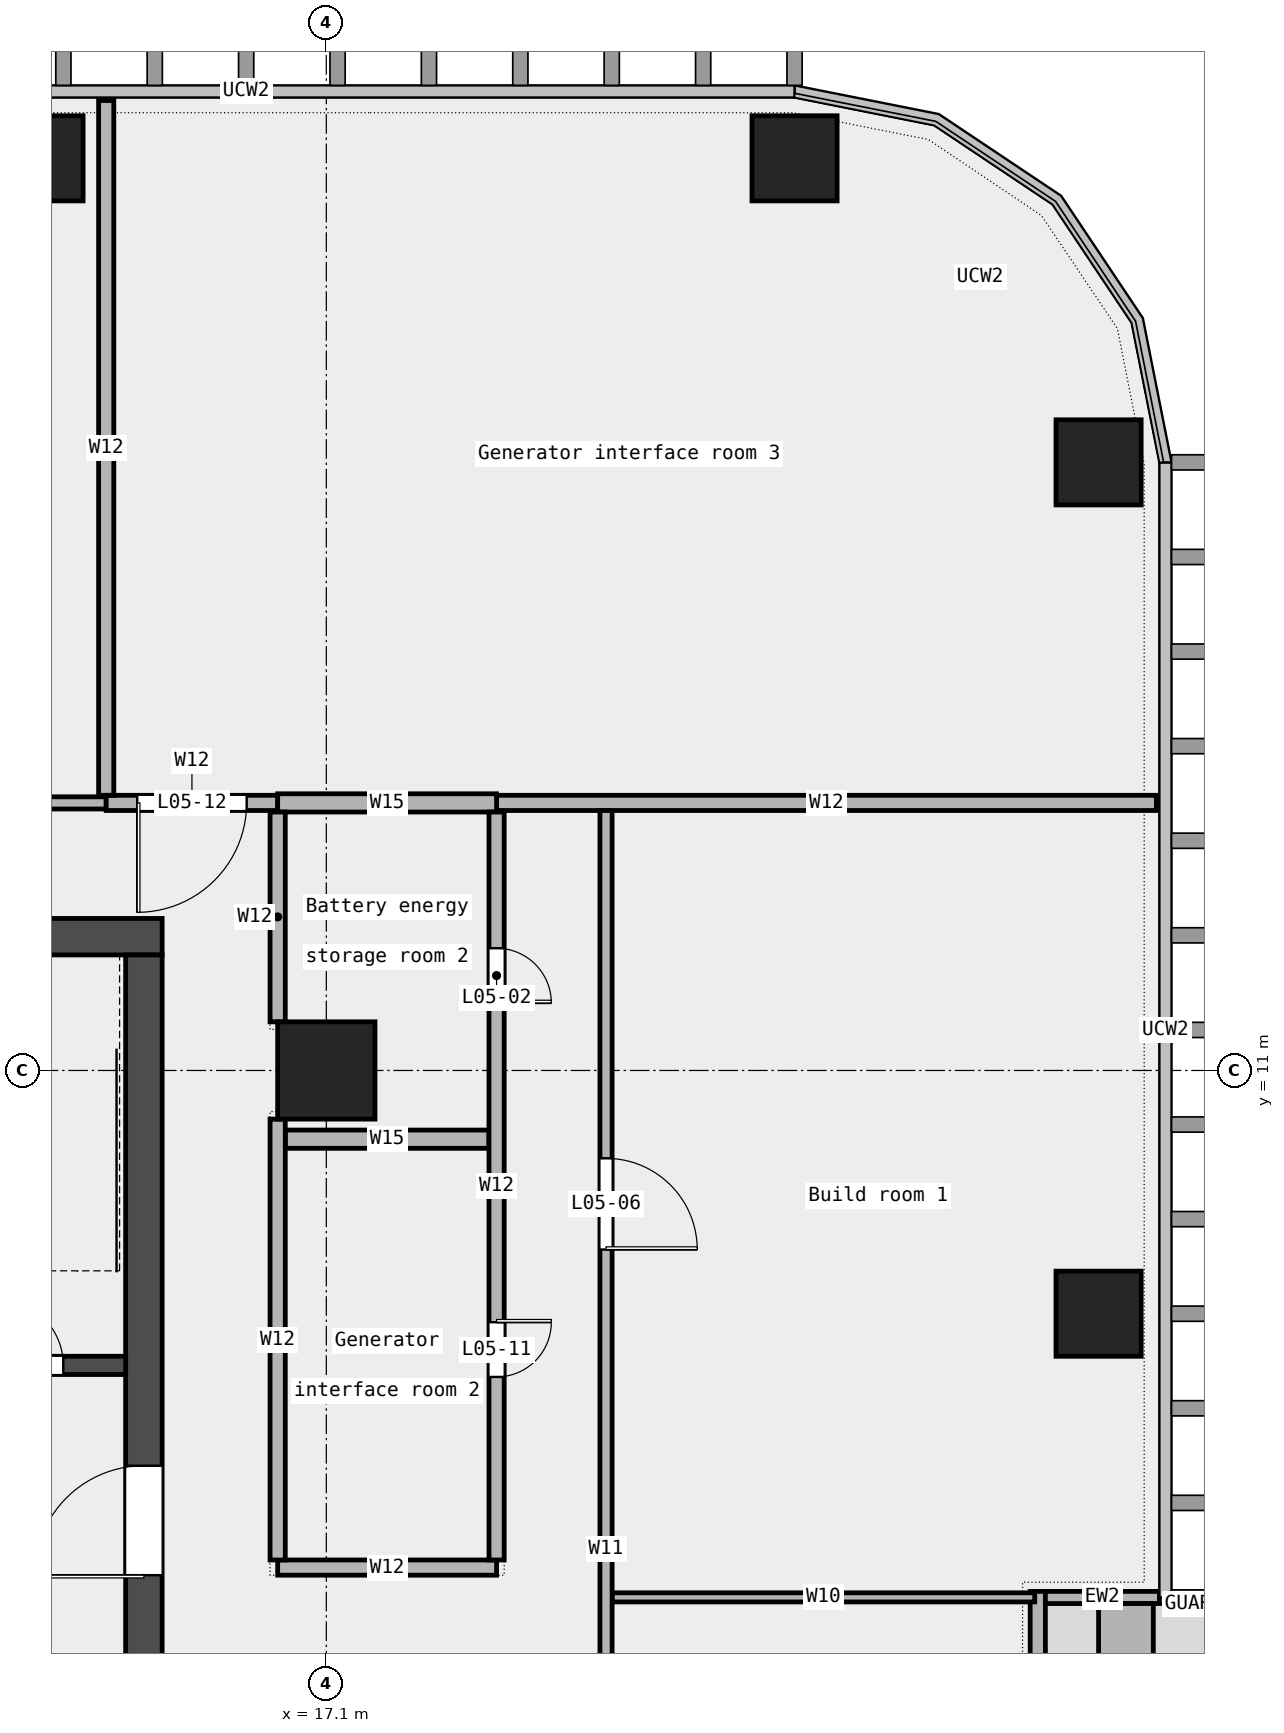
"""IFC4 building model, lengths in metres.
Left out: names, types, materials, properties, quantities, classifications, styles, units other than length and angle.
Written with IfcOpenShell. Run it as: python <this file> out.ifc"""

import sys

from ifc_helpers import new_model, si_unit, direction, frame, frame_2d, origin, origin_2d, place, context, subcontext, project, spatial, rectangle, extrude, element, fill, save


model = new_model("IFC4")
c1 = context("Model", 3, precision=1e-05, world=origin(), true_north=direction((0.0, 1.0)))
c2 = subcontext(c1, "Body", "Model", "MODEL_VIEW")
j1 = project(units=[si_unit("LENGTHUNIT", "METRE"), si_unit("PLANEANGLEUNIT", "RADIAN")], contexts=[c1])
p1 = place(None, origin())
s1 = spatial("IfcSite", under=j1, at=p1, CompositionType="ELEMENT")
p2 = place(p1, origin())
s2 = spatial("IfcBuilding", under=s1, at=p2, CompositionType="ELEMENT")
p3 = place(p2, frame((0.0, 0.0, 31.0)))
s3 = spatial("IfcBuildingStorey", under=s2, at=p3, CompositionType="ELEMENT", Elevation=31.0)
for number, where, z_axis, x_axis in (
    (1, (29.8, 7.0, 0.0), (0.0, 0.0, 1.0), (1.0, 0.0, 0.0)),
    (2, (29.8, 21.0, 0.0), (0.0, 0.0, 1.0), (1.0, 0.0, 0.0)),
    (3, (24.8, 26.0, 0.0), (0.0, 0.0, 1.0), (1.0, 0.0, 0.0)),
    (4, (12.4, 26.0, 0.0), (0.0, 0.0, 1.0), (1.0, 0.0, 0.0)),
):
    element("IfcColumn", number, at=place(p3, frame(where, z_axis=z_axis, x_axis=x_axis)), inside=s3, PredefinedType="COLUMN", context=c2, shape_type="SweptSolid", body=[
        extrude(rectangle(XDim=1.4, YDim=1.4, at=origin_2d()), origin(), (0.0, 0.0, 1.0), 4.35),
    ])
p4 = place(p3, frame((17.1, 11.0, 0.0), z_axis=(0.0, 0.0, 1.0), x_axis=(1.0, 0.0, 0.0)))
e5 = element("IfcColumn", 5, at=p4, inside=s3, PredefinedType="COLUMN", context=c2, shape_type="SweptSolid", body=[
    extrude(rectangle(XDim=1.6, YDim=1.6, at=origin_2d()), origin(), (0.0, 0.0, 1.0), 4.35),
])
p5 = place(p3, frame((28.8, -11.767, 0.0), z_axis=(0.0, 0.0, 1.0), x_axis=(0.0, 1.0, 0.0)))
e6 = element("IfcWall", 6, at=p5, inside=s3, PredefinedType="STANDARD", context=c2, shape_type="SweptSolid", body=[
    extrude(rectangle(XDim=14.2, YDim=0.25, at=frame_2d((7.1, 0.0))), origin(), (0.0, 0.0, 1.0), 4.35),
])
p6 = place(p5, frame((1.75, 0.0, 0.45)))
e7 = element("IfcOpeningElement", 7, at=p6, cuts=e6, PredefinedType="OPENING", context=c2, shape_type="SweptSolid", body=[
    extrude(rectangle(XDim=1.5, YDim=3.0, at=frame_2d((0.75, 1.5))), frame((0.0, 0.137, 0.0), z_axis=(0.0, -1.0, 0.0), x_axis=(1.0, 0.0, 0.0)), (0.0, 0.0, 1.0), 0.274),
])
p7 = place(p5, frame((6.25, 0.0, 0.0)))
e8 = element("IfcOpeningElement", 8, at=p7, cuts=e6, PredefinedType="OPENING", context=c2, shape_type="SweptSolid", body=[
    extrude(rectangle(XDim=1.8, YDim=2.4, at=frame_2d((0.9, 1.2))), frame((0.0, 0.137, 0.0), z_axis=(0.0, -1.0, 0.0), x_axis=(1.0, 0.0, 0.0)), (0.0, 0.0, 1.0), 0.274),
])
p8 = place(p5, frame((11.0, 0.0, 0.45)))
e9 = element("IfcOpeningElement", 9, at=p8, cuts=e6, PredefinedType="OPENING", context=c2, shape_type="SweptSolid", body=[
    extrude(rectangle(XDim=1.5, YDim=3.0, at=frame_2d((0.75, 1.5))), frame((0.0, 0.137, 0.0), z_axis=(0.0, -1.0, 0.0), x_axis=(1.0, 0.0, 0.0)), (0.0, 0.0, 1.0), 0.274),
])
p9 = place(p3, frame((30.8, 2.333, 0.0), z_axis=(0.0, 0.0, 1.0), x_axis=(-1.0, 0.0, 0.0)))
e10 = element("IfcWall", 10, at=p9, inside=s3, PredefinedType="STANDARD", context=c2, shape_type="SweptSolid", body=[
    extrude(rectangle(XDim=1.875, YDim=0.2, at=frame_2d((0.938, 0.0))), origin(), (0.0, 0.0, 1.0), 4.35),
])
p10 = place(p3, frame((30.25, -1.367, 0.0), z_axis=(0.0, 0.0, 1.0), x_axis=(0.0, 1.0, 0.0)))
e11 = element("IfcWall", 11, at=p10, inside=s3, PredefinedType="STANDARD", context=c2, shape_type="SweptSolid", body=[
    extrude(rectangle(XDim=3.6, YDim=0.9, at=frame_2d((1.8, 0.0))), origin(), (0.0, 0.0, 1.0), 0.7),
])
p11 = place(p3, frame((21.8, 2.335, 0.0), z_axis=(0.0, 0.0, 1.0), x_axis=(1.0, 0.0, 0.0)))
e12 = element("IfcWall", 12, at=p11, inside=s3, PredefinedType="PARTITIONING", context=c2, shape_type="SweptSolid", body=[
    extrude(rectangle(XDim=6.95, YDim=0.15, at=frame_2d((3.475, 0.0))), origin(), (0.0, 0.0, 1.0), 4.35),
])
p12 = place(p3, frame((16.3, 2.825, 0.0), z_axis=(0.0, 0.0, 1.0), x_axis=(1.0, 0.0, 0.0)))
e13 = element("IfcWall", 13, at=p12, inside=s3, PredefinedType="PARTITIONING", context=c2, shape_type="SweptSolid", body=[
    extrude(rectangle(XDim=3.6, YDim=0.25, at=frame_2d((1.8, 0.0))), origin(), (0.0, 0.0, 1.0), 4.35),
])
p13 = place(p3, frame((16.425, 9.87, 0.0), z_axis=(0.0, 0.0, 1.0), x_axis=(1.0, 0.0, 0.0)))
e14 = element("IfcWall", 14, at=p13, inside=s3, PredefinedType="PARTITIONING", context=c2, shape_type="SweptSolid", body=[
    extrude(rectangle(XDim=3.35, YDim=0.3, at=frame_2d((1.675, 0.0))), origin(), (0.0, 0.0, 1.0), 4.35),
])
p14 = place(p3, frame((-6.765, 15.4, 0.0), z_axis=(0.0, 0.0, 1.0), x_axis=(1.0, 0.0, 0.0)))
e15 = element("IfcWall", 15, at=p14, inside=s3, PredefinedType="PARTITIONING", context=c2, shape_type="SweptSolid", body=[
    extrude(rectangle(XDim=20.245, YDim=0.2, at=frame_2d((10.123, 0.0))), origin(), (0.0, 0.0, 1.0), 4.35),
])
p15 = place(p14, frame((6.015, 0.0, 0.0)))
e16 = element("IfcOpeningElement", 16, at=p15, cuts=e15, PredefinedType="OPENING", context=c2, shape_type="SweptSolid", body=[
    extrude(rectangle(XDim=1.5, YDim=2.1, at=frame_2d((0.75, 1.05))), frame((0.0, 0.112, 0.0), z_axis=(0.0, -1.0, 0.0), x_axis=(1.0, 0.0, 0.0)), (0.0, 0.0, 1.0), 0.224),
])
p16 = place(p14, frame((16.288, 0.0, 0.0)))
e17 = element("IfcOpeningElement", 17, at=p16, cuts=e15, PredefinedType="OPENING", context=c2, shape_type="SweptSolid", body=[
    extrude(rectangle(XDim=1.2, YDim=2.1, at=frame_2d((0.6, 1.05))), frame((0.0, 0.112, 0.0), z_axis=(0.0, -1.0, 0.0), x_axis=(1.0, 0.0, 0.0)), (0.0, 0.0, 1.0), 0.224),
])
p17 = place(p3, frame((13.48, 15.4, 0.0), z_axis=(0.0, 0.0, 1.0), x_axis=(1.0, 0.0, 0.0)))
e18 = element("IfcWall", 18, at=p17, inside=s3, PredefinedType="PARTITIONING", context=c2, shape_type="SweptSolid", body=[
    extrude(rectangle(XDim=2.82, YDim=0.25, at=frame_2d((1.41, 0.0))), origin(), (0.0, 0.0, 1.0), 4.35),
])
p18 = place(p17, frame((0.51, 0.0, 0.0)))
e19 = element("IfcOpeningElement", 19, at=p18, cuts=e18, PredefinedType="OPENING", context=c2, shape_type="SweptSolid", body=[
    extrude(rectangle(XDim=1.8, YDim=2.1, at=frame_2d((0.9, 1.05))), frame((0.0, 0.137, 0.0), z_axis=(0.0, -1.0, 0.0), x_axis=(1.0, 0.0, 0.0)), (0.0, 0.0, 1.0), 0.274),
])
p19 = place(p3, frame((19.9, 15.4, 0.0), z_axis=(0.0, 0.0, 1.0), x_axis=(1.0, 0.0, 0.0)))
e20 = element("IfcWall", 20, at=p19, inside=s3, PredefinedType="PARTITIONING", context=c2, shape_type="SweptSolid", body=[
    extrude(rectangle(XDim=10.85, YDim=0.25, at=frame_2d((5.425, 0.0))), origin(), (0.0, 0.0, 1.0), 4.35),
])
p20 = place(p3, frame((16.3, 15.4, 0.0), z_axis=(0.0, 0.0, 1.0), x_axis=(1.0, 0.0, 0.0)))
e21 = element("IfcWall", 21, at=p20, inside=s3, PredefinedType="PARTITIONING", context=c2, shape_type="SweptSolid", body=[
    extrude(rectangle(XDim=3.6, YDim=0.3, at=frame_2d((1.8, 0.0))), origin(), (0.0, 0.0, 1.0), 4.35),
])
p21 = place(p3, frame((13.48, 15.525, 0.0), z_axis=(0.0, 0.0, 1.0), x_axis=(0.0, 1.0, 0.0)))
e22 = element("IfcWall", 22, at=p21, inside=s3, PredefinedType="PARTITIONING", context=c2, shape_type="SweptSolid", body=[
    extrude(rectangle(XDim=11.425, YDim=0.25, at=frame_2d((5.712, 0.0))), origin(), (0.0, 0.0, 1.0), 4.35),
])
p22 = place(p3, frame((16.3, 2.95, 0.0), z_axis=(0.0, 0.0, 1.0), x_axis=(0.0, 1.0, 0.0)))
e23 = element("IfcWall", 23, at=p22, inside=s3, PredefinedType="PARTITIONING", context=c2, shape_type="SweptSolid", body=[
    extrude(rectangle(XDim=7.25, YDim=0.25, at=frame_2d((3.625, 0.0))), origin(), (0.0, 0.0, 1.0), 4.35),
])
p23 = place(p3, frame((16.3, 11.8, 0.0), z_axis=(0.0, 0.0, 1.0), x_axis=(0.0, 1.0, 0.0)))
e24 = element("IfcWall", 24, at=p23, inside=s3, PredefinedType="PARTITIONING", context=c2, shape_type="SweptSolid", body=[
    extrude(rectangle(XDim=3.45, YDim=0.25, at=frame_2d((1.725, 0.0))), origin(), (0.0, 0.0, 1.0), 4.35),
])
p24 = place(p3, frame((19.9, 2.95, 0.0), z_axis=(0.0, 0.0, 1.0), x_axis=(0.0, 1.0, 0.0)))
e25 = element("IfcWall", 25, at=p24, inside=s3, PredefinedType="PARTITIONING", context=c2, shape_type="SweptSolid", body=[
    extrude(rectangle(XDim=12.3, YDim=0.25, at=frame_2d((6.15, 0.0))), origin(), (0.0, 0.0, 1.0), 4.35),
])
p25 = place(p24, frame((9.16, 0.0, 0.0)))
e26 = element("IfcOpeningElement", 26, at=p25, cuts=e25, PredefinedType="OPENING", context=c2, shape_type="SweptSolid", body=[
    extrude(rectangle(XDim=0.9, YDim=2.1, at=frame_2d((0.45, 1.05))), frame((0.0, 0.137, 0.0), z_axis=(0.0, -1.0, 0.0), x_axis=(1.0, 0.0, 0.0)), (0.0, 0.0, 1.0), 0.274),
])
p26 = place(p24, frame((3.01, 0.0, 0.0)))
e27 = element("IfcOpeningElement", 27, at=p26, cuts=e25, PredefinedType="OPENING", context=c2, shape_type="SweptSolid", body=[
    extrude(rectangle(XDim=0.9, YDim=2.1, at=frame_2d((0.45, 1.05))), frame((0.0, 0.137, 0.0), z_axis=(0.0, -1.0, 0.0), x_axis=(1.0, 0.0, 0.0)), (0.0, 0.0, 1.0), 0.274),
])
p27 = place(p3, frame((21.7, -9.0, 0.0), z_axis=(0.0, 0.0, 1.0), x_axis=(0.0, 1.0, 0.0)))
e28 = element("IfcWall", 28, at=p27, inside=s3, PredefinedType="PARTITIONING", context=c2, shape_type="SweptSolid", body=[
    extrude(rectangle(XDim=24.275, YDim=0.2, at=frame_2d((12.137, 0.0))), origin(), (0.0, 0.0, 1.0), 4.35),
])
p28 = place(p27, frame((4.768, 0.0, 0.0)))
e29 = element("IfcOpeningElement", 29, at=p28, cuts=e28, PredefinedType="OPENING", context=c2, shape_type="SweptSolid", body=[
    extrude(rectangle(XDim=1.8, YDim=2.1, at=frame_2d((0.9, 1.05))), frame((0.0, 0.112, 0.0), z_axis=(0.0, -1.0, 0.0), x_axis=(1.0, 0.0, 0.0)), (0.0, 0.0, 1.0), 0.224),
])
p29 = place(p27, frame((17.055, 0.0, 0.0)))
e30 = element("IfcOpeningElement", 30, at=p29, cuts=e28, PredefinedType="OPENING", context=c2, shape_type="SweptSolid", body=[
    extrude(rectangle(XDim=1.5, YDim=2.1, at=frame_2d((0.75, 1.05))), frame((0.0, 0.112, 0.0), z_axis=(0.0, -1.0, 0.0), x_axis=(1.0, 0.0, 0.0)), (0.0, 0.0, 1.0), 0.224),
])
p30 = place(p3, frame((-14.4, 13.2, 0.0), z_axis=(0.0, 0.0, 1.0), x_axis=(1.0, 0.0, 0.0)))
e31 = element("IfcWall", 31, at=p30, inside=s3, PredefinedType="SHEAR", context=c2, shape_type="SweptSolid", body=[
    extrude(rectangle(XDim=28.8, YDim=0.6, at=frame_2d((14.4, 0.0))), origin(), (0.0, 0.0, 1.0), 4.5),
])
p31 = place(p30, frame((6.4, 0.0, 0.0)))
e32 = element("IfcOpeningElement", 32, at=p31, cuts=e31, PredefinedType="OPENING", context=c2, shape_type="SweptSolid", body=[
    extrude(rectangle(XDim=1.0, YDim=2.1, at=frame_2d((0.5, 1.05))), frame((0.0, 0.312, 0.0), z_axis=(0.0, -1.0, 0.0), x_axis=(1.0, 0.0, 0.0)), (0.0, 0.0, 1.0), 0.624),
])
p32 = place(p30, frame((11.462, 0.0, 0.0)))
e33 = element("IfcOpeningElement", 33, at=p32, cuts=e31, PredefinedType="OPENING", context=c2, shape_type="SweptSolid", body=[
    extrude(rectangle(XDim=1.0, YDim=2.1, at=frame_2d((0.5, 1.05))), frame((0.0, 0.312, 0.0), z_axis=(0.0, -1.0, 0.0), x_axis=(1.0, 0.0, 0.0)), (0.0, 0.0, 1.0), 0.624),
])
p33 = place(p30, frame((16.337, 0.0, 0.0)))
e34 = element("IfcOpeningElement", 34, at=p33, cuts=e31, PredefinedType="OPENING", context=c2, shape_type="SweptSolid", body=[
    extrude(rectangle(XDim=1.0, YDim=2.1, at=frame_2d((0.5, 1.05))), frame((0.0, 0.312, 0.0), z_axis=(0.0, -1.0, 0.0), x_axis=(1.0, 0.0, 0.0)), (0.0, 0.0, 1.0), 0.624),
])
p34 = place(p30, frame((21.775, 0.0, 0.0)))
e35 = element("IfcOpeningElement", 35, at=p34, cuts=e31, PredefinedType="OPENING", context=c2, shape_type="SweptSolid", body=[
    extrude(rectangle(XDim=1.0, YDim=2.1, at=frame_2d((0.5, 1.05))), frame((0.0, 0.312, 0.0), z_axis=(0.0, -1.0, 0.0), x_axis=(1.0, 0.0, 0.0)), (0.0, 0.0, 1.0), 0.624),
])
p35 = place(p3, frame((14.1, -6.6, 0.0), z_axis=(0.0, 0.0, 1.0), x_axis=(0.0, 1.0, 0.0)))
e36 = element("IfcWall", 36, at=p35, inside=s3, PredefinedType="SHEAR", context=c2, shape_type="SweptSolid", body=[
    extrude(rectangle(XDim=19.5, YDim=0.6, at=frame_2d((9.75, 0.0))), origin(), (0.0, 0.0, 1.0), 4.5),
])
p36 = place(p35, frame((9.3, 0.0, 0.0)))
e37 = element("IfcOpeningElement", 37, at=p36, cuts=e36, PredefinedType="OPENING", context=c2, shape_type="SweptSolid", body=[
    extrude(rectangle(XDim=1.8, YDim=2.1, at=frame_2d((0.9, 1.05))), frame((0.0, 0.312, 0.0), z_axis=(0.0, -1.0, 0.0), x_axis=(1.0, 0.0, 0.0)), (0.0, 0.0, 1.0), 0.624),
])
p37 = place(p3, frame((10.65, 6.15, 0.0), z_axis=(0.0, 0.0, 1.0), x_axis=(1.0, 0.0, 0.0)))
e38 = element("IfcWall", 38, at=p37, inside=s3, PredefinedType="SOLIDWALL", context=c2, shape_type="SweptSolid", body=[
    extrude(rectangle(XDim=3.15, YDim=0.3, at=frame_2d((1.575, 0.0))), origin(), (0.0, 0.0, 1.0), 4.5),
])
p38 = place(p37, frame((1.025, 0.0, 0.0)))
e39 = element("IfcOpeningElement", 39, at=p38, cuts=e38, PredefinedType="OPENING", context=c2, shape_type="SweptSolid", body=[
    extrude(rectangle(XDim=1.1, YDim=2.1, at=frame_2d((0.55, 1.05))), frame((0.0, 0.162, 0.0), z_axis=(0.0, -1.0, 0.0), x_axis=(1.0, 0.0, 0.0)), (0.0, 0.0, 1.0), 0.324),
])
p39 = place(p25, origin())
e40 = element("IfcDoor", 40, at=p39, inside=s3, OperationType="SINGLE_SWING_RIGHT", PredefinedType="DOOR", context=c2, shape_type="SweptSolid", body=[
    extrude(rectangle(XDim=0.9, YDim=2.1, at=frame_2d((0.45, 1.05))), frame((0.0, 0.025, 0.0), z_axis=(0.0, -1.0, 0.0), x_axis=(1.0, 0.0, 0.0)), (0.0, 0.0, 1.0), 0.05),
])
fill(e26, e40)
p40 = place(p29, origin())
e41 = element("IfcDoor", 41, at=p40, inside=s3, OperationType="DOUBLE_DOOR_SINGLE_SWING", PredefinedType="DOOR", context=c2, shape_type="SweptSolid", body=[
    extrude(rectangle(XDim=1.5, YDim=2.1, at=frame_2d((0.75, 1.05))), frame((0.0, 0.025, 0.0), z_axis=(0.0, -1.0, 0.0), x_axis=(1.0, 0.0, 0.0)), (0.0, 0.0, 1.0), 0.05),
])
fill(e30, e41)
p41 = place(p26, origin())
e42 = element("IfcDoor", 42, at=p41, inside=s3, OperationType="SINGLE_SWING_LEFT", PredefinedType="DOOR", context=c2, shape_type="SweptSolid", body=[
    extrude(rectangle(XDim=0.9, YDim=2.1, at=frame_2d((0.45, 1.05))), frame((0.0, 0.025, 0.0), z_axis=(0.0, -1.0, 0.0), x_axis=(1.0, 0.0, 0.0)), (0.0, 0.0, 1.0), 0.05),
])
fill(e27, e42)
p42 = place(p18, origin())
e43 = element("IfcDoor", 43, at=p42, inside=s3, OperationType="DOUBLE_DOOR_SINGLE_SWING", PredefinedType="DOOR", context=c2, shape_type="SweptSolid", body=[
    extrude(rectangle(XDim=1.8, YDim=2.1, at=frame_2d((0.9, 1.05))), frame((0.0, 0.025, 0.0), z_axis=(0.0, -1.0, 0.0), x_axis=(1.0, 0.0, 0.0)), (0.0, 0.0, 1.0), 0.05),
])
fill(e19, e43)
p43 = place(p38, origin())
e44 = element("IfcDoor", 44, at=p43, inside=s3, OperationType="SINGLE_SWING_RIGHT", PredefinedType="DOOR", context=c2, shape_type="SweptSolid", body=[
    extrude(rectangle(XDim=1.1, YDim=2.1, at=frame_2d((0.55, 1.05))), frame((0.0, 0.025, 0.0), z_axis=(0.0, -1.0, 0.0), x_axis=(1.0, 0.0, 0.0)), (0.0, 0.0, 1.0), 0.05),
])
fill(e39, e44)
p44 = place(p36, origin())
e45 = element("IfcDoor", 45, at=p44, inside=s3, OperationType="DOUBLE_DOOR_SINGLE_SWING", PredefinedType="DOOR", context=c2, shape_type="SweptSolid", body=[
    extrude(rectangle(XDim=1.8, YDim=2.1, at=frame_2d((0.9, 1.05))), frame((0.0, 0.025, 0.0), z_axis=(0.0, -1.0, 0.0), x_axis=(1.0, 0.0, 0.0)), (0.0, 0.0, 1.0), 0.05),
])
fill(e37, e45)
save(model, sys.argv[1])
